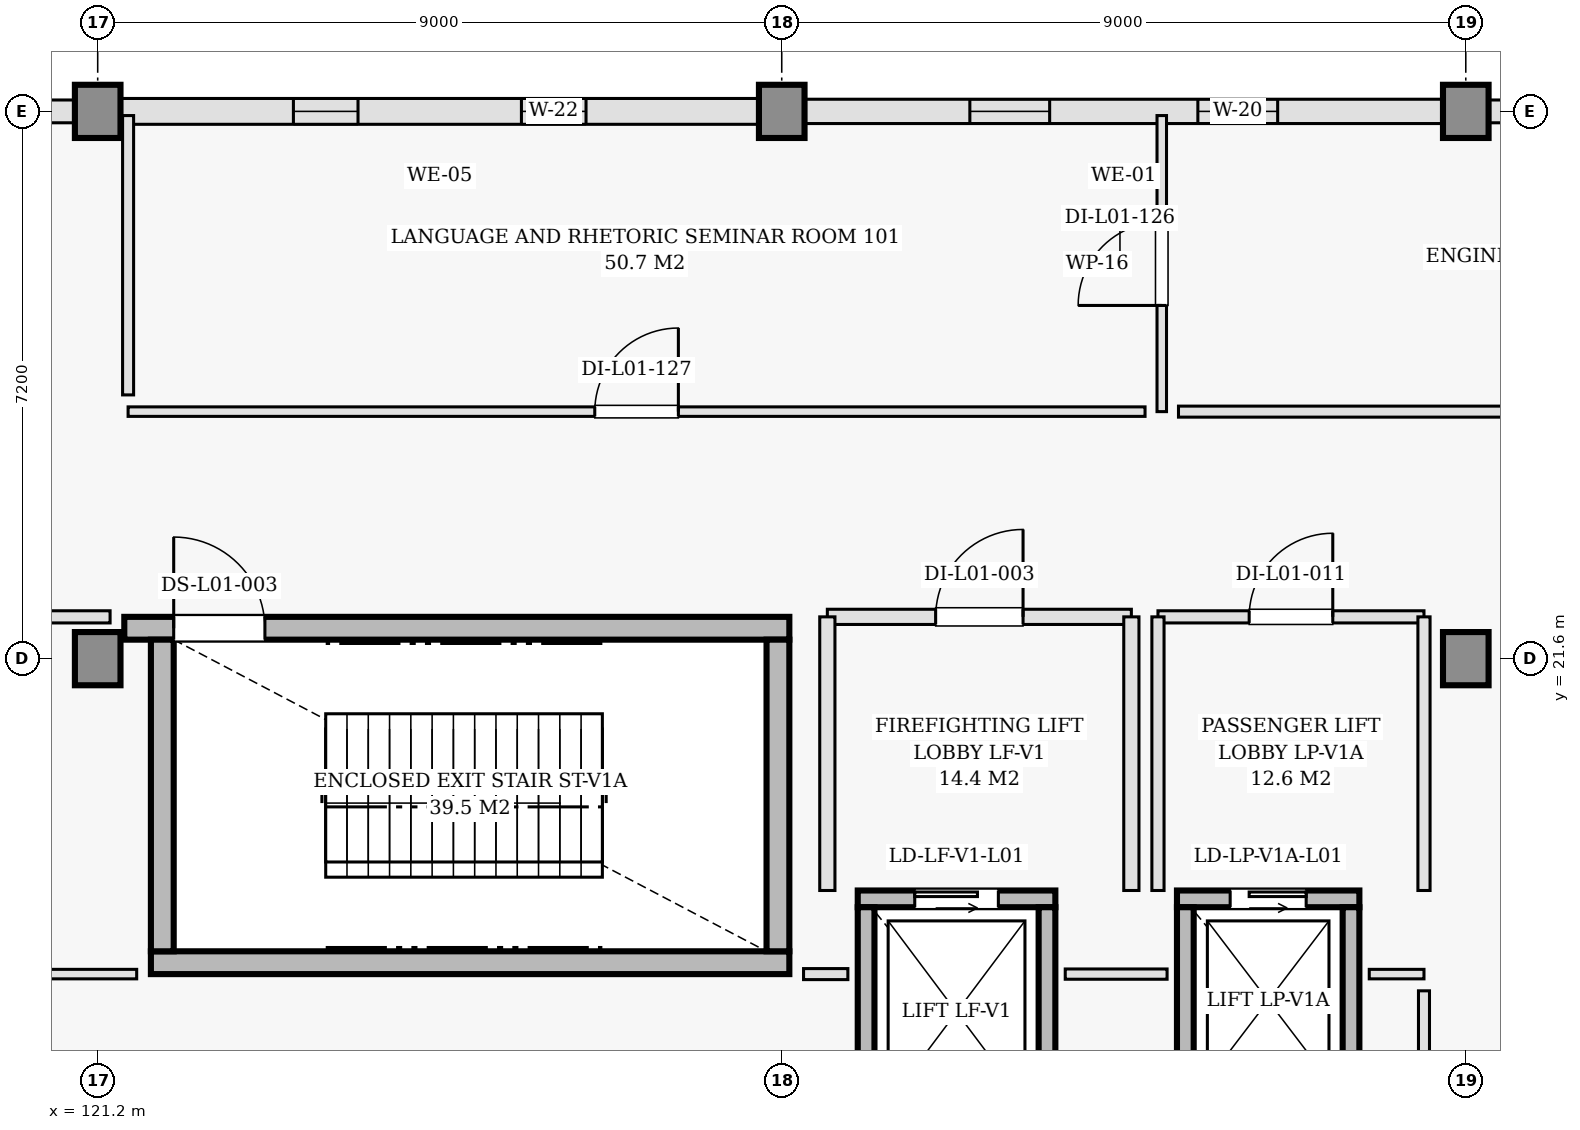
"""IFC4 building model, lengths in metres.
Left out: names, types, materials, properties, quantities, classifications, styles, units other than length and angle.
Written with IfcOpenShell. Run it as: python <this file> out.ifc"""

import sys

from ifc_helpers import new_model, si_unit, direction, frame, frame_2d, origin, origin_2d, place, context, subcontext, project, spatial, rectangle, extrude, element, fill, save


model = new_model("IFC4")
c1 = context("Model", 3, precision=1e-05, world=origin(), true_north=direction((0.0, 1.0)))
c2 = subcontext(c1, "Body", "Model", "MODEL_VIEW")
j1 = project(units=[si_unit("LENGTHUNIT", "METRE"), si_unit("PLANEANGLEUNIT", "RADIAN")], contexts=[c1])
p1 = place(None, origin())
s1 = spatial("IfcSite", under=j1, at=p1, CompositionType="ELEMENT")
p2 = place(p1, origin())
s2 = spatial("IfcBuilding", under=s1, at=p2, CompositionType="ELEMENT")
p3 = place(p2, frame((0.0, 0.0, 4.8)))
s3 = spatial("IfcBuildingStorey", under=s2, at=p3, CompositionType="ELEMENT", Elevation=4.8)
for number, where, z_axis, x_axis in (
    (1, (121.2, 21.6, 0.0), (0.0, 0.0, 1.0), (1.0, 0.0, 0.0)),
    (2, (121.2, 28.8, 0.0), (0.0, 0.0, 1.0), (1.0, 0.0, 0.0)),
    (3, (130.2, 28.8, 0.0), (0.0, 0.0, 1.0), (1.0, 0.0, 0.0)),
    (4, (139.2, 21.6, 0.0), (0.0, 0.0, 1.0), (1.0, 0.0, 0.0)),
    (5, (139.2, 28.8, 0.0), (0.0, 0.0, 1.0), (1.0, 0.0, 0.0)),
):
    element("IfcColumn", number, at=place(p3, frame(where, z_axis=z_axis, x_axis=x_axis)), inside=s3, PredefinedType="COLUMN", context=c2, shape_type="SweptSolid", body=[
        extrude(rectangle(XDim=0.7, YDim=0.7, at=origin_2d()), origin(), (0.0, 0.0, 1.0), 4.8),
    ])
p4 = place(p3, frame((148.2, 28.8, 0.0), z_axis=(0.0, 0.0, 1.0), x_axis=(-1.0, 0.0, 0.0)))
e6 = element("IfcWall", 6, at=p4, inside=s3, PredefinedType="SOLIDWALL", context=c2, shape_type="SweptSolid", body=[
    extrude(rectangle(XDim=9.0, YDim=0.3, at=frame_2d((4.5, 0.0))), origin(), (0.0, 0.0, 1.0), 3.665),
])
p5 = place(p4, frame((2.375, 0.0, 0.9)))
e7 = element("IfcOpeningElement", 7, at=p5, cuts=e6, PredefinedType="OPENING", context=c2, shape_type="SweptSolid", body=[
    extrude(rectangle(XDim=1.25, YDim=1.5, at=frame_2d((0.625, 0.75))), frame((0.0, 0.16, 0.0), z_axis=(0.0, -1.0, 0.0), x_axis=(1.0, 0.0, 0.0)), (0.0, 0.0, 1.0), 0.32),
])
p6 = place(p4, frame((5.375, 0.0, 0.9)))
e8 = element("IfcOpeningElement", 8, at=p6, cuts=e6, PredefinedType="OPENING", context=c2, shape_type="SweptSolid", body=[
    extrude(rectangle(XDim=1.25, YDim=1.5, at=frame_2d((0.625, 0.75))), frame((0.0, 0.16, 0.0), z_axis=(0.0, -1.0, 0.0), x_axis=(1.0, 0.0, 0.0)), (0.0, 0.0, 1.0), 0.32),
])
p7 = place(p3, frame((139.2, 28.8, 0.0), z_axis=(0.0, 0.0, 1.0), x_axis=(-1.0, 0.0, 0.0)))
e9 = element("IfcWall", 9, at=p7, inside=s3, PredefinedType="SOLIDWALL", context=c2, shape_type="SweptSolid", body=[
    extrude(rectangle(XDim=9.0, YDim=0.32, at=frame_2d((4.5, 0.0))), origin(), (0.0, 0.0, 1.0), 3.665),
])
p8 = place(p7, frame((2.475, 0.0, 0.9)))
e10 = element("IfcOpeningElement", 10, at=p8, cuts=e9, PredefinedType="OPENING", context=c2, shape_type="SweptSolid", body=[
    extrude(rectangle(XDim=1.05, YDim=1.4, at=frame_2d((0.525, 0.7))), frame((0.0, 0.17, 0.0), z_axis=(0.0, -1.0, 0.0), x_axis=(1.0, 0.0, 0.0)), (0.0, 0.0, 1.0), 0.34),
])
p9 = place(p7, frame((5.475, 0.0, 0.9)))
e11 = element("IfcOpeningElement", 11, at=p9, cuts=e9, PredefinedType="OPENING", context=c2, shape_type="SweptSolid", body=[
    extrude(rectangle(XDim=1.05, YDim=1.4, at=frame_2d((0.525, 0.7))), frame((0.0, 0.17, 0.0), z_axis=(0.0, -1.0, 0.0), x_axis=(1.0, 0.0, 0.0)), (0.0, 0.0, 1.0), 0.34),
])
p10 = place(p3, frame((130.2, 28.8, 0.0), z_axis=(0.0, 0.0, 1.0), x_axis=(-1.0, 0.0, 0.0)))
e12 = element("IfcWall", 12, at=p10, inside=s3, PredefinedType="SOLIDWALL", context=c2, shape_type="SweptSolid", body=[
    extrude(rectangle(XDim=9.0, YDim=0.34, at=frame_2d((4.5, 0.0))), origin(), (0.0, 0.0, 1.0), 3.665),
])
p11 = place(p10, frame((2.575, 0.0, 0.9)))
e13 = element("IfcOpeningElement", 13, at=p11, cuts=e12, PredefinedType="OPENING", context=c2, shape_type="SweptSolid", body=[
    extrude(rectangle(XDim=0.85, YDim=1.3, at=frame_2d((0.425, 0.65))), frame((0.0, 0.18, 0.0), z_axis=(0.0, -1.0, 0.0), x_axis=(1.0, 0.0, 0.0)), (0.0, 0.0, 1.0), 0.36),
])
p12 = place(p10, frame((5.575, 0.0, 0.9)))
e14 = element("IfcOpeningElement", 14, at=p12, cuts=e12, PredefinedType="OPENING", context=c2, shape_type="SweptSolid", body=[
    extrude(rectangle(XDim=0.85, YDim=1.3, at=frame_2d((0.425, 0.65))), frame((0.0, 0.18, 0.0), z_axis=(0.0, -1.0, 0.0), x_axis=(1.0, 0.0, 0.0)), (0.0, 0.0, 1.0), 0.36),
])
p13 = place(p3, frame((121.2, 28.8, 0.0), z_axis=(0.0, 0.0, 1.0), x_axis=(-1.0, 0.0, 0.0)))
e15 = element("IfcWall", 15, at=p13, inside=s3, PredefinedType="SOLIDWALL", context=c2, shape_type="SweptSolid", body=[
    extrude(rectangle(XDim=8.75, YDim=0.3, at=frame_2d((4.375, 0.0))), origin(), (0.0, 0.0, 1.0), 3.665),
])
p14 = place(p13, frame((2.192, 0.0, 0.9)))
e16 = element("IfcOpeningElement", 16, at=p14, cuts=e15, PredefinedType="OPENING", context=c2, shape_type="SweptSolid", body=[
    extrude(rectangle(XDim=1.45, YDim=1.6, at=frame_2d((0.725, 0.8))), frame((0.0, 0.16, 0.0), z_axis=(0.0, -1.0, 0.0), x_axis=(1.0, 0.0, 0.0)), (0.0, 0.0, 1.0), 0.32),
])
p15 = place(p13, frame((5.108, 0.0, 0.9)))
e17 = element("IfcOpeningElement", 17, at=p15, cuts=e15, PredefinedType="OPENING", context=c2, shape_type="SweptSolid", body=[
    extrude(rectangle(XDim=1.45, YDim=1.6, at=frame_2d((0.725, 0.8))), frame((0.0, 0.16, 0.0), z_axis=(0.0, -1.0, 0.0), x_axis=(1.0, 0.0, 0.0)), (0.0, 0.0, 1.0), 0.32),
])
p16 = place(p3, frame((121.9, 17.6, 0.0), z_axis=(0.0, 0.0, 1.0), x_axis=(1.0, 0.0, 0.0)))
e18 = element("IfcWall", 18, at=p16, inside=s3, PredefinedType="SHEAR", context=c2, shape_type="SweptSolid", body=[
    extrude(rectangle(XDim=8.4, YDim=0.3, at=frame_2d((4.2, 0.0))), origin(), (0.0, 0.0, 1.0), 4.48),
])
p17 = place(p3, frame((121.55, 22.0, 0.0), z_axis=(0.0, 0.0, 1.0), x_axis=(1.0, 0.0, 0.0)))
e19 = element("IfcWall", 19, at=p17, inside=s3, PredefinedType="SHEAR", context=c2, shape_type="SweptSolid", body=[
    extrude(rectangle(XDim=8.75, YDim=0.3, at=frame_2d((4.375, 0.0))), origin(), (0.0, 0.0, 1.0), 4.48),
])
p18 = place(p17, frame((0.65, 0.0, 0.0)))
e20 = element("IfcOpeningElement", 20, at=p18, cuts=e19, PredefinedType="OPENING", context=c2, shape_type="SweptSolid", body=[
    extrude(rectangle(XDim=1.2, YDim=2.15, at=frame_2d((0.6, 1.075))), frame((0.0, 0.16, 0.0), z_axis=(0.0, -1.0, 0.0), x_axis=(1.0, 0.0, 0.0)), (0.0, 0.0, 1.0), 0.32),
])
for number, where, z_axis, x_axis in (
    (21, (122.05, 17.75, 0.0), (0.0, 0.0, 1.0), (0.0, 1.0, 0.0)),
    (22, (130.15, 17.75, 0.0), (0.0, 0.0, 1.0), (0.0, 1.0, 0.0)),
):
    element("IfcWall", number, at=place(p3, frame(where, z_axis=z_axis, x_axis=x_axis)), inside=s3, PredefinedType="SHEAR", context=c2, shape_type="SweptSolid", body=[
        extrude(rectangle(XDim=4.1, YDim=0.3, at=frame_2d((2.05, 0.0))), origin(), (0.0, 0.0, 1.0), 4.48),
    ])
p19 = place(p3, frame((131.2, 18.44, 0.0), z_axis=(0.0, 0.0, 1.0), x_axis=(1.0, 0.0, 0.0)))
e23 = element("IfcWall", 23, at=p19, inside=s3, PredefinedType="SHEAR", context=c2, shape_type="SweptSolid", body=[
    extrude(rectangle(XDim=2.6, YDim=0.22, at=frame_2d((1.3, 0.0))), origin(), (0.0, 0.0, 1.0), 4.48),
])
p20 = place(p19, frame((0.75, 0.0, 0.0)))
e24 = element("IfcOpeningElement", 24, at=p20, cuts=e23, PredefinedType="OPENING", context=c2, shape_type="SweptSolid", body=[
    extrude(rectangle(XDim=1.1, YDim=2.15, at=frame_2d((0.55, 1.075))), frame((0.0, 0.12, 0.0), z_axis=(0.0, -1.0, 0.0), x_axis=(1.0, 0.0, 0.0)), (0.0, 0.0, 1.0), 0.24),
])
for number, where, z_axis, x_axis in (
    (25, (131.31, 15.57, 0.0), (0.0, 0.0, 1.0), (0.0, 1.0, 0.0)),
    (26, (133.69, 15.57, 0.0), (0.0, 0.0, 1.0), (0.0, 1.0, 0.0)),
):
    element("IfcWall", number, at=place(p3, frame(where, z_axis=z_axis, x_axis=x_axis)), inside=s3, PredefinedType="SHEAR", context=c2, shape_type="SweptSolid", body=[
        extrude(rectangle(XDim=2.76, YDim=0.22, at=frame_2d((1.38, 0.0))), origin(), (0.0, 0.0, 1.0), 4.48),
    ])
p21 = place(p3, frame((130.8, 22.15, 0.0), z_axis=(0.0, 0.0, 1.0), x_axis=(1.0, 0.0, 0.0)))
e27 = element("IfcWall", 27, at=p21, inside=s3, PredefinedType="PARTITIONING", context=c2, shape_type="SweptSolid", body=[
    extrude(rectangle(XDim=4.0, YDim=0.2, at=frame_2d((2.0, 0.0))), origin(), (0.0, 0.0, 1.0), 4.48),
])
p22 = place(p21, frame((1.425, 0.0, 0.0)))
e28 = element("IfcOpeningElement", 28, at=p22, cuts=e27, PredefinedType="OPENING", context=c2, shape_type="SweptSolid", body=[
    extrude(rectangle(XDim=1.15, YDim=2.15, at=frame_2d((0.575, 1.075))), frame((0.0, 0.11, 0.0), z_axis=(0.0, -1.0, 0.0), x_axis=(1.0, 0.0, 0.0)), (0.0, 0.0, 1.0), 0.22),
])
for number, where, z_axis, x_axis in (
    (29, (130.8, 18.55, 0.0), (0.0, 0.0, 1.0), (0.0, 1.0, 0.0)),
    (30, (134.8, 18.55, 0.0), (0.0, 0.0, 1.0), (0.0, 1.0, 0.0)),
):
    element("IfcWall", number, at=place(p3, frame(where, z_axis=z_axis, x_axis=x_axis)), inside=s3, PredefinedType="PARTITIONING", context=c2, shape_type="SweptSolid", body=[
        extrude(rectangle(XDim=3.6, YDim=0.2, at=frame_2d((1.8, 0.0))), origin(), (0.0, 0.0, 1.0), 4.48),
    ])
p23 = place(p3, frame((135.4, 18.44, 0.0), z_axis=(0.0, 0.0, 1.0), x_axis=(1.0, 0.0, 0.0)))
e31 = element("IfcWall", 31, at=p23, inside=s3, PredefinedType="SHEAR", context=c2, shape_type="SweptSolid", body=[
    extrude(rectangle(XDim=2.4, YDim=0.22, at=frame_2d((1.2, 0.0))), origin(), (0.0, 0.0, 1.0), 4.48),
])
p24 = place(p23, frame((0.7, 0.0, 0.0)))
e32 = element("IfcOpeningElement", 32, at=p24, cuts=e31, PredefinedType="OPENING", context=c2, shape_type="SweptSolid", body=[
    extrude(rectangle(XDim=1.0, YDim=2.15, at=frame_2d((0.5, 1.075))), frame((0.0, 0.12, 0.0), z_axis=(0.0, -1.0, 0.0), x_axis=(1.0, 0.0, 0.0)), (0.0, 0.0, 1.0), 0.24),
])
for number, where, z_axis, x_axis in (
    (33, (135.51, 15.87, 0.0), (0.0, 0.0, 1.0), (0.0, 1.0, 0.0)),
    (34, (137.69, 15.87, 0.0), (0.0, 0.0, 1.0), (0.0, 1.0, 0.0)),
):
    element("IfcWall", number, at=place(p3, frame(where, z_axis=z_axis, x_axis=x_axis)), inside=s3, PredefinedType="SHEAR", context=c2, shape_type="SweptSolid", body=[
        extrude(rectangle(XDim=2.46, YDim=0.22, at=frame_2d((1.23, 0.0))), origin(), (0.0, 0.0, 1.0), 4.48),
    ])
p25 = place(p3, frame((135.15, 22.15, 0.0), z_axis=(0.0, 0.0, 1.0), x_axis=(1.0, 0.0, 0.0)))
e35 = element("IfcWall", 35, at=p25, inside=s3, PredefinedType="PARTITIONING", context=c2, shape_type="SweptSolid", body=[
    extrude(rectangle(XDim=3.5, YDim=0.16, at=frame_2d((1.75, 0.0))), origin(), (0.0, 0.0, 1.0), 4.48),
])
p26 = place(p25, frame((1.2, 0.0, 0.0)))
e36 = element("IfcOpeningElement", 36, at=p26, cuts=e35, PredefinedType="OPENING", context=c2, shape_type="SweptSolid", body=[
    extrude(rectangle(XDim=1.1, YDim=2.15, at=frame_2d((0.55, 1.075))), frame((0.0, 0.09, 0.0), z_axis=(0.0, -1.0, 0.0), x_axis=(1.0, 0.0, 0.0)), (0.0, 0.0, 1.0), 0.18),
])
for number, where, z_axis, x_axis in (
    (37, (135.15, 18.55, 0.0), (0.0, 0.0, 1.0), (0.0, 1.0, 0.0)),
    (38, (138.65, 18.55, 0.0), (0.0, 0.0, 1.0), (0.0, 1.0, 0.0)),
):
    element("IfcWall", number, at=place(p3, frame(where, z_axis=z_axis, x_axis=x_axis)), inside=s3, PredefinedType="PARTITIONING", context=c2, shape_type="SweptSolid", body=[
        extrude(rectangle(XDim=3.6, YDim=0.16, at=frame_2d((1.8, 0.0))), origin(), (0.0, 0.0, 1.0), 4.48),
    ])
p27 = place(p3, frame((135.2, 24.85, 0.0), z_axis=(0.0, 0.0, 1.0), x_axis=(0.0, 1.0, 0.0)))
e39 = element("IfcWall", 39, at=p27, inside=s3, PredefinedType="PARTITIONING", context=c2, shape_type="SweptSolid", body=[
    extrude(rectangle(XDim=3.895, YDim=0.125, at=frame_2d((1.948, 0.0))), origin(), (0.0, 0.0, 1.0), 3.665),
])
p28 = place(p27, frame((1.397, 0.0, 0.0)))
e40 = element("IfcOpeningElement", 40, at=p28, cuts=e39, PredefinedType="OPENING", context=c2, shape_type="SweptSolid", body=[
    extrude(rectangle(XDim=1.1, YDim=2.15, at=frame_2d((0.55, 1.075))), frame((0.0, 0.073, 0.0), z_axis=(0.0, -1.0, 0.0), x_axis=(1.0, 0.0, 0.0)), (0.0, 0.0, 1.0), 0.145),
])
p29 = place(p3, frame((135.42, 24.85, 0.0), z_axis=(0.0, 0.0, 1.0), x_axis=(1.0, 0.0, 0.0)))
e41 = element("IfcWall", 41, at=p29, inside=s3, PredefinedType="PARTITIONING", context=c2, shape_type="SweptSolid", body=[
    extrude(rectangle(XDim=12.78, YDim=0.145, at=frame_2d((6.39, 0.0))), origin(), (0.0, 0.0, 1.0), 3.815),
])
p30 = place(p3, frame((121.6, 24.85, 0.0), z_axis=(0.0, 0.0, 1.0), x_axis=(1.0, 0.0, 0.0)))
e42 = element("IfcWall", 42, at=p30, inside=s3, PredefinedType="PARTITIONING", context=c2, shape_type="SweptSolid", body=[
    extrude(rectangle(XDim=13.38, YDim=0.125, at=frame_2d((6.69, 0.0))), origin(), (0.0, 0.0, 1.0), 4.48),
])
p31 = place(p30, frame((6.14, 0.0, 0.0)))
e43 = element("IfcOpeningElement", 43, at=p31, cuts=e42, PredefinedType="OPENING", context=c2, shape_type="SweptSolid", body=[
    extrude(rectangle(XDim=1.1, YDim=2.15, at=frame_2d((0.55, 1.075))), frame((0.0, 0.073, 0.0), z_axis=(0.0, -1.0, 0.0), x_axis=(1.0, 0.0, 0.0)), (0.0, 0.0, 1.0), 0.145),
])
p32 = place(p3, frame((121.6, 25.07, 0.0), z_axis=(0.0, 0.0, 1.0), x_axis=(0.0, 1.0, 0.0)))
e44 = element("IfcWall", 44, at=p32, inside=s3, PredefinedType="PARTITIONING", context=c2, shape_type="SweptSolid", body=[
    extrude(rectangle(XDim=3.675, YDim=0.145, at=frame_2d((1.837, 0.0))), origin(), (0.0, 0.0, 1.0), 3.665),
])
p33 = place(p3, frame((119.82, 17.45, 0.0), z_axis=(0.0, 0.0, 1.0), x_axis=(1.0, 0.0, 0.0)))
e45 = element("IfcWall", 45, at=p33, inside=s3, PredefinedType="PARTITIONING", context=c2, shape_type="SweptSolid", body=[
    extrude(rectangle(XDim=1.893, YDim=0.125, at=frame_2d((0.946, 0.0))), origin(), (0.0, 0.0, 1.0), 3.815),
])
p34 = place(p3, frame((130.487, 17.45, 0.0), z_axis=(0.0, 0.0, 1.0), x_axis=(1.0, 0.0, 0.0)))
e46 = element("IfcWall", 46, at=p34, inside=s3, PredefinedType="PARTITIONING", context=c2, shape_type="SweptSolid", body=[
    extrude(rectangle(XDim=0.583, YDim=0.145, at=frame_2d((0.292, 0.0))), origin(), (0.0, 0.0, 1.0), 4.48),
])
p35 = place(p3, frame((133.93, 17.45, 0.0), z_axis=(0.0, 0.0, 1.0), x_axis=(1.0, 0.0, 0.0)))
e47 = element("IfcWall", 47, at=p35, inside=s3, PredefinedType="PARTITIONING", context=c2, shape_type="SweptSolid", body=[
    extrude(rectangle(XDim=1.34, YDim=0.135, at=frame_2d((0.67, 0.0))), origin(), (0.0, 0.0, 1.0), 4.48),
])
p36 = place(p3, frame((137.93, 17.45, 0.0), z_axis=(0.0, 0.0, 1.0), x_axis=(1.0, 0.0, 0.0)))
e48 = element("IfcWall", 48, at=p36, inside=s3, PredefinedType="PARTITIONING", context=c2, shape_type="SweptSolid", body=[
    extrude(rectangle(XDim=0.72, YDim=0.125, at=frame_2d((0.36, 0.0))), origin(), (0.0, 0.0, 1.0), 4.48),
])
p37 = place(p3, frame((138.65, 14.6, 0.0), z_axis=(0.0, 0.0, 1.0), x_axis=(0.0, 1.0, 0.0)))
e49 = element("IfcWall", 49, at=p37, inside=s3, PredefinedType="PARTITIONING", context=c2, shape_type="SweptSolid", body=[
    extrude(rectangle(XDim=2.63, YDim=0.145, at=frame_2d((1.315, 0.0))), origin(), (0.0, 0.0, 1.0), 3.665),
])
p38 = place(p3, frame((119.6, 22.15, 0.0), z_axis=(0.0, 0.0, 1.0), x_axis=(1.0, 0.0, 0.0)))
e50 = element("IfcWall", 50, at=p38, inside=s3, PredefinedType="PARTITIONING", context=c2, shape_type="SweptSolid", body=[
    extrude(rectangle(XDim=1.763, YDim=0.16, at=frame_2d((0.881, 0.0))), origin(), (0.0, 0.0, 1.0), 3.815),
])
p39 = place(p8, origin())
e51 = element("IfcWindow", 51, at=p39, inside=s3, PartitioningType="DOUBLE_PANEL_VERTICAL", PredefinedType="WINDOW", context=c2, shape_type="SweptSolid", body=[
    extrude(rectangle(XDim=1.05, YDim=1.4, at=frame_2d((0.525, 0.7))), frame((0.0, 0.03, 0.0), z_axis=(0.0, -1.0, 0.0), x_axis=(1.0, 0.0, 0.0)), (0.0, 0.0, 1.0), 0.06),
])
fill(e10, e51)
p40 = place(p9, origin())
e52 = element("IfcWindow", 52, at=p40, inside=s3, PartitioningType="DOUBLE_PANEL_VERTICAL", PredefinedType="WINDOW", context=c2, shape_type="SweptSolid", body=[
    extrude(rectangle(XDim=1.05, YDim=1.4, at=frame_2d((0.525, 0.7))), frame((0.0, 0.03, 0.0), z_axis=(0.0, -1.0, 0.0), x_axis=(1.0, 0.0, 0.0)), (0.0, 0.0, 1.0), 0.06),
])
fill(e11, e52)
p41 = place(p11, origin())
e53 = element("IfcWindow", 53, at=p41, inside=s3, PartitioningType="DOUBLE_PANEL_VERTICAL", PredefinedType="WINDOW", context=c2, shape_type="SweptSolid", body=[
    extrude(rectangle(XDim=0.85, YDim=1.3, at=frame_2d((0.425, 0.65))), frame((0.0, 0.03, 0.0), z_axis=(0.0, -1.0, 0.0), x_axis=(1.0, 0.0, 0.0)), (0.0, 0.0, 1.0), 0.06),
])
fill(e13, e53)
p42 = place(p12, origin())
e54 = element("IfcWindow", 54, at=p42, inside=s3, PartitioningType="DOUBLE_PANEL_VERTICAL", PredefinedType="WINDOW", context=c2, shape_type="SweptSolid", body=[
    extrude(rectangle(XDim=0.85, YDim=1.3, at=frame_2d((0.425, 0.65))), frame((0.0, 0.03, 0.0), z_axis=(0.0, -1.0, 0.0), x_axis=(1.0, 0.0, 0.0)), (0.0, 0.0, 1.0), 0.06),
])
fill(e14, e54)
p43 = place(p18, origin())
e55 = element("IfcDoor", 55, at=p43, inside=s3, OperationType="SINGLE_SWING_LEFT", PredefinedType="DOOR", context=c2, shape_type="SweptSolid", body=[
    extrude(rectangle(XDim=1.2, YDim=2.15, at=frame_2d((0.6, 1.075))), frame((0.0, 0.025, 0.0), z_axis=(0.0, -1.0, 0.0), x_axis=(1.0, 0.0, 0.0)), (0.0, 0.0, 1.0), 0.05),
])
fill(e20, e55)
p44 = place(p20, origin())
e56 = element("IfcDoor", 56, at=p44, inside=s3, OperationType="SLIDING_TO_LEFT", PredefinedType="DOOR", context=c2, shape_type="SweptSolid", body=[
    extrude(rectangle(XDim=1.1, YDim=2.15, at=frame_2d((0.55, 1.075))), frame((0.0, 0.025, 0.0), z_axis=(0.0, -1.0, 0.0), x_axis=(1.0, 0.0, 0.0)), (0.0, 0.0, 1.0), 0.05),
])
fill(e24, e56)
p45 = place(p22, origin())
e57 = element("IfcDoor", 57, at=p45, inside=s3, OperationType="SINGLE_SWING_RIGHT", PredefinedType="DOOR", context=c2, shape_type="SweptSolid", body=[
    extrude(rectangle(XDim=1.15, YDim=2.15, at=frame_2d((0.575, 1.075))), frame((0.0, 0.025, 0.0), z_axis=(0.0, -1.0, 0.0), x_axis=(1.0, 0.0, 0.0)), (0.0, 0.0, 1.0), 0.05),
])
fill(e28, e57)
p46 = place(p24, origin())
e58 = element("IfcDoor", 58, at=p46, inside=s3, OperationType="SLIDING_TO_RIGHT", PredefinedType="DOOR", context=c2, shape_type="SweptSolid", body=[
    extrude(rectangle(XDim=1.0, YDim=2.15, at=frame_2d((0.5, 1.075))), frame((0.0, 0.025, 0.0), z_axis=(0.0, -1.0, 0.0), x_axis=(1.0, 0.0, 0.0)), (0.0, 0.0, 1.0), 0.05),
])
fill(e32, e58)
p47 = place(p26, origin())
e59 = element("IfcDoor", 59, at=p47, inside=s3, OperationType="SINGLE_SWING_RIGHT", PredefinedType="DOOR", context=c2, shape_type="SweptSolid", body=[
    extrude(rectangle(XDim=1.1, YDim=2.15, at=frame_2d((0.55, 1.075))), frame((0.0, 0.025, 0.0), z_axis=(0.0, -1.0, 0.0), x_axis=(1.0, 0.0, 0.0)), (0.0, 0.0, 1.0), 0.05),
])
fill(e36, e59)
p48 = place(p28, origin())
e60 = element("IfcDoor", 60, at=p48, inside=s3, OperationType="SINGLE_SWING_LEFT", PredefinedType="DOOR", context=c2, shape_type="SweptSolid", body=[
    extrude(rectangle(XDim=1.1, YDim=2.15, at=frame_2d((0.55, 1.075))), frame((0.0, 0.025, 0.0), z_axis=(0.0, -1.0, 0.0), x_axis=(1.0, 0.0, 0.0)), (0.0, 0.0, 1.0), 0.05),
])
fill(e40, e60)
p49 = place(p31, origin())
e61 = element("IfcDoor", 61, at=p49, inside=s3, OperationType="SINGLE_SWING_RIGHT", PredefinedType="DOOR", context=c2, shape_type="SweptSolid", body=[
    extrude(rectangle(XDim=1.1, YDim=2.15, at=frame_2d((0.55, 1.075))), frame((0.0, 0.025, 0.0), z_axis=(0.0, -1.0, 0.0), x_axis=(1.0, 0.0, 0.0)), (0.0, 0.0, 1.0), 0.05),
])
fill(e43, e61)
save(model, sys.argv[1])
